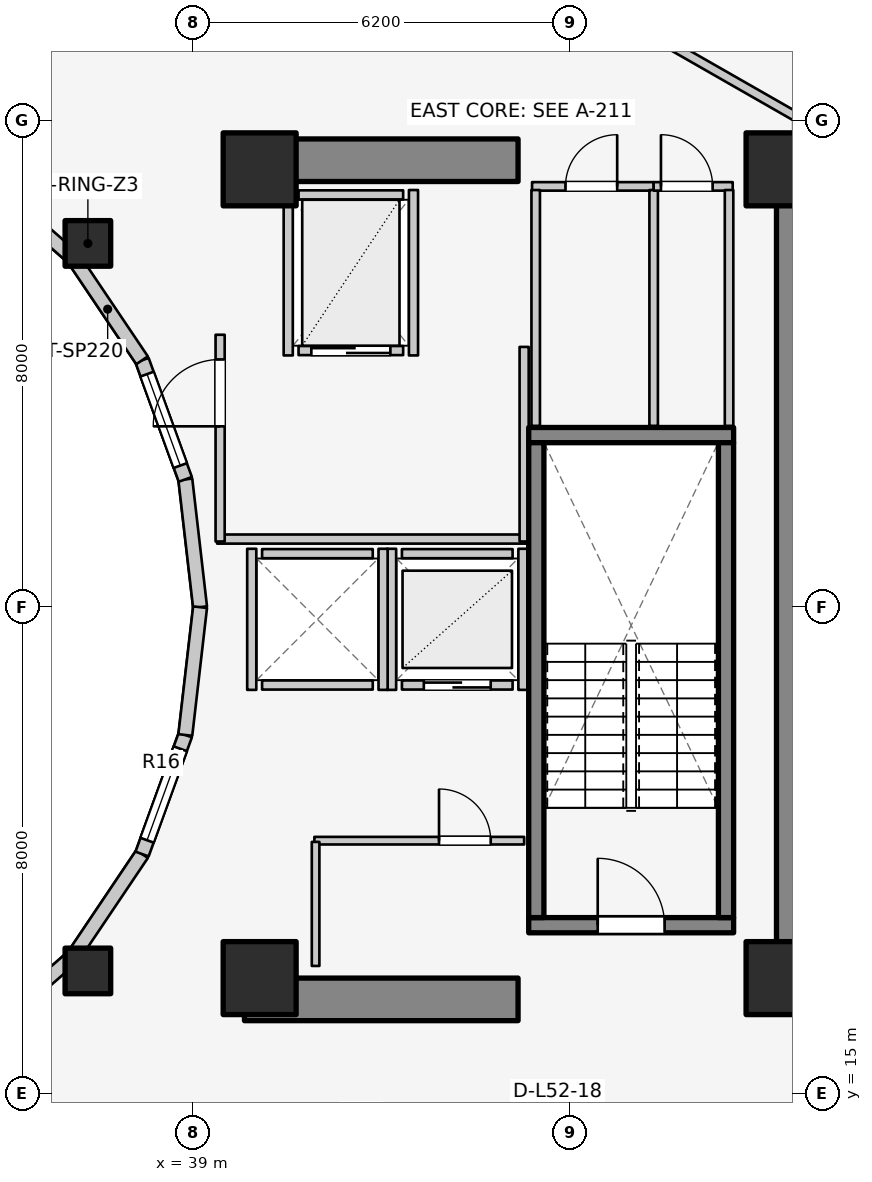
"""IFC4 building model, lengths in metres.
Left out: names, types, materials, properties, quantities, classifications, styles, units other than length and angle.
Written with IfcOpenShell. Run it as: python <this file> out.ifc"""

import sys

from ifc_helpers import new_model, si_unit, direction, frame, frame_2d, origin, origin_2d, place, context, subcontext, project, spatial, rectangle, extrude, element, fill, save


model = new_model("IFC4")
c1 = context("Model", 3, precision=1e-05, world=origin(), true_north=direction((0.0, 1.0)))
c2 = subcontext(c1, "Body", "Model", "MODEL_VIEW")
j1 = project(units=[si_unit("LENGTHUNIT", "METRE"), si_unit("PLANEANGLEUNIT", "RADIAN")], contexts=[c1])
p1 = place(None, origin())
s1 = spatial("IfcSite", under=j1, at=p1, CompositionType="ELEMENT")
p2 = place(p1, origin())
s2 = spatial("IfcBuilding", under=s1, at=p2, CompositionType="ELEMENT")
p3 = place(p2, frame((0.0, 0.0, 171.5)))
s3 = spatial("IfcBuildingStorey", under=s2, at=p3, CompositionType="ELEMENT", Elevation=171.5)
p4 = place(p3, frame((48.95, 17.05, 0.0), z_axis=(0.0, 0.0, 1.0), x_axis=(0.0, 1.0, 0.0)))
e1 = element("IfcWall", 1, at=p4, inside=s3, PredefinedType="SHEAR", context=c2, shape_type="SweptSolid", body=[
    extrude(rectangle(XDim=12.8, YDim=0.7, at=frame_2d((6.4, 0.0))), origin(), (0.0, 0.0, 1.0), 3.1),
])
for number, where, z_axis, x_axis in (
    (2, (39.85, 16.55, 0.0), (0.0, 0.0, 1.0), (1.0, 0.0, 0.0)),
    (3, (39.85, 30.35, 0.0), (0.0, 0.0, 1.0), (1.0, 0.0, 0.0)),
):
    element("IfcWall", number, at=place(p3, frame(where, z_axis=z_axis, x_axis=x_axis)), inside=s3, PredefinedType="SHEAR", context=c2, shape_type="SweptSolid", body=[
        extrude(rectangle(XDim=4.5, YDim=0.7, at=frame_2d((2.25, 0.0))), origin(), (0.0, 0.0, 1.0), 3.1),
    ])
p5 = place(p3, frame((44.525, 17.77, 0.0), z_axis=(0.0, 0.0, 1.0), x_axis=(1.0, 0.0, 0.0)))
e4 = element("IfcWall", 4, at=p5, inside=s3, PredefinedType="SOLIDWALL", context=c2, shape_type="SweptSolid", body=[
    extrude(rectangle(XDim=3.37, YDim=0.25, at=frame_2d((1.685, 0.0))), origin(), (0.0, 0.0, 1.0), 3.1),
])
p6 = place(p5, frame((1.135, 0.0, 0.0)))
e5 = element("IfcOpeningElement", 5, at=p6, cuts=e4, PredefinedType="OPENING", context=c2, shape_type="SweptSolid", body=[
    extrude(rectangle(XDim=1.1, YDim=2.1, at=frame_2d((0.55, 1.05))), frame((0.0, 0.135, 0.0), z_axis=(0.0, -1.0, 0.0), x_axis=(1.0, 0.0, 0.0)), (0.0, 0.0, 1.0), 0.27),
])
p7 = place(p3, frame((44.525, 25.83, 0.0), z_axis=(0.0, 0.0, 1.0), x_axis=(1.0, 0.0, 0.0)))
e6 = element("IfcWall", 6, at=p7, inside=s3, PredefinedType="SOLIDWALL", context=c2, shape_type="SweptSolid", body=[
    extrude(rectangle(XDim=3.37, YDim=0.25, at=frame_2d((1.685, 0.0))), origin(), (0.0, 0.0, 1.0), 3.1),
])
for number, where, z_axis, x_axis in (
    (7, (44.65, 17.895, 0.0), (0.0, 0.0, 1.0), (0.0, 1.0, 0.0)),
    (8, (47.77, 17.895, 0.0), (0.0, 0.0, 1.0), (0.0, 1.0, 0.0)),
):
    element("IfcWall", number, at=place(p3, frame(where, z_axis=z_axis, x_axis=x_axis)), inside=s3, PredefinedType="SOLIDWALL", context=c2, shape_type="SweptSolid", body=[
        extrude(rectangle(XDim=7.81, YDim=0.25, at=frame_2d((3.905, 0.0))), origin(), (0.0, 0.0, 1.0), 3.1),
    ])
for number, where, z_axis, x_axis in (
    (9, (40.1, 16.9, 0.0), (0.0, 0.0, 1.0), (1.0, 0.0, 0.0)),
    (10, (48.7, 16.9, 0.0), (0.0, 0.0, 1.0), (1.0, 0.0, 0.0)),
    (11, (48.7, 30.2, 0.0), (0.0, 0.0, 1.0), (1.0, 0.0, 0.0)),
    (12, (40.1, 30.2, 0.0), (0.0, 0.0, 1.0), (1.0, 0.0, 0.0)),
):
    element("IfcColumn", number, at=place(p3, frame(where, z_axis=z_axis, x_axis=x_axis)), inside=s3, PredefinedType="COLUMN", context=c2, shape_type="SweptSolid", body=[
        extrude(rectangle(XDim=1.2, YDim=1.2, at=origin_2d()), origin(), (0.0, 0.0, 1.0), 3.1),
    ])
for number, where, z_axis, x_axis in (
    (13, (37.275, 28.982, 0.0), (0.0, 0.0, 1.0), (1.0, 0.0, 0.0)),
    (14, (37.275, 17.018, 0.0), (0.0, 0.0, 1.0), (1.0, 0.0, 0.0)),
):
    element("IfcColumn", number, at=place(p3, frame(where, z_axis=z_axis, x_axis=x_axis)), inside=s3, PredefinedType="COLUMN", context=c2, shape_type="SweptSolid", body=[
        extrude(rectangle(XDim=0.75, YDim=0.75, at=origin_2d()), origin(), (0.0, 0.0, 1.0), 3.1),
    ])
p8 = place(p3, frame((39.12, 23.0, 0.0), z_axis=(0.0, 0.0, 1.0), x_axis=(-0.114711713601, 0.993398823617, 0.0)))
e15 = element("IfcWall", 15, at=p8, inside=s3, PredefinedType="STANDARD", context=c2, shape_type="SweptSolid", body=[
    extrude(rectangle(XDim=2.115, YDim=0.23, at=frame_2d((1.058, 0.0))), origin(), (0.0, 0.0, 1.0), 2.84),
])
p9 = place(p3, frame((38.877, 25.102, 0.0), z_axis=(0.0, 0.0, 1.0), x_axis=(-0.341423187295, 0.93990968033, 0.0)))
e16 = element("IfcWall", 16, at=p9, inside=s3, PredefinedType="STANDARD", context=c2, shape_type="SweptSolid", body=[
    extrude(rectangle(XDim=2.084, YDim=0.23, at=frame_2d((1.042, 0.0))), origin(), (0.0, 0.0, 1.0), 2.84),
])
p10 = place(p9, frame((0.242, 0.0, 0.85)))
e17 = element("IfcOpeningElement", 17, at=p10, cuts=e16, PredefinedType="OPENING", context=c2, shape_type="SweptSolid", body=[
    extrude(rectangle(XDim=1.6, YDim=1.65, at=frame_2d((0.8, 0.825))), frame((0.0, 0.125, 0.0), z_axis=(0.0, -1.0, 0.0), x_axis=(1.0, 0.0, 0.0)), (0.0, 0.0, 1.0), 0.25),
])
p11 = place(p3, frame((38.166, 27.06, 0.0), z_axis=(0.0, 0.0, 1.0), x_axis=(-0.558197800898, 0.829707909492, 0.0)))
e18 = element("IfcWall", 18, at=p11, inside=s3, PredefinedType="STANDARD", context=c2, shape_type="SweptSolid", body=[
    extrude(rectangle(XDim=2.027, YDim=0.23, at=frame_2d((1.013, 0.0))), origin(), (0.0, 0.0, 1.0), 2.16),
])
for number, where, z_axis, x_axis in (
    (19, (37.035, 28.742, 0.0), (0.0, 0.0, 1.0), (-0.753, 0.659, 0.0)),
    (20, (35.56, 15.968, 0.0), (0.0, 0.0, 1.0), (0.753, 0.659, 0.0)),
):
    element("IfcWall", number, at=place(p3, frame(where, z_axis=z_axis, x_axis=x_axis)), inside=s3, PredefinedType="STANDARD", context=c2, shape_type="SweptSolid", body=[
        extrude(rectangle(XDim=1.959, YDim=0.23, at=frame_2d((0.98, 0.0))), origin(), (0.0, 0.0, 1.0), 2.16),
    ])
p12 = place(p3, frame((37.035, 17.258, 0.0), z_axis=(0.0, 0.0, 1.0), x_axis=(0.558197800898, 0.829707909492, 0.0)))
e21 = element("IfcWall", 21, at=p12, inside=s3, PredefinedType="STANDARD", context=c2, shape_type="SweptSolid", body=[
    extrude(rectangle(XDim=2.027, YDim=0.23, at=frame_2d((1.013, 0.0))), origin(), (0.0, 0.0, 1.0), 2.16),
])
p13 = place(p3, frame((38.166, 18.94, 0.0), z_axis=(0.0, 0.0, 1.0), x_axis=(0.341423187295, 0.93990968033, 0.0)))
e22 = element("IfcWall", 22, at=p13, inside=s3, PredefinedType="STANDARD", context=c2, shape_type="SweptSolid", body=[
    extrude(rectangle(XDim=2.084, YDim=0.23, at=frame_2d((1.042, 0.0))), origin(), (0.0, 0.0, 1.0), 2.84),
])
p14 = place(p13, frame((0.242, 0.0, 0.85)))
e23 = element("IfcOpeningElement", 23, at=p14, cuts=e22, PredefinedType="OPENING", context=c2, shape_type="SweptSolid", body=[
    extrude(rectangle(XDim=1.6, YDim=1.65, at=frame_2d((0.8, 0.825))), frame((0.0, 0.125, 0.0), z_axis=(0.0, -1.0, 0.0), x_axis=(1.0, 0.0, 0.0)), (0.0, 0.0, 1.0), 0.25),
])
p15 = place(p3, frame((38.877, 20.898, 0.0), z_axis=(0.0, 0.0, 1.0), x_axis=(0.114711713601, 0.993398823617, 0.0)))
e24 = element("IfcWall", 24, at=p15, inside=s3, PredefinedType="STANDARD", context=c2, shape_type="SweptSolid", body=[
    extrude(rectangle(XDim=2.115, YDim=0.23, at=frame_2d((1.058, 0.0))), origin(), (0.0, 0.0, 1.0), 2.84),
])
p16 = place(p3, frame((42.44, 21.72, 0.0), z_axis=(0.0, 0.0, 1.0), x_axis=(1.0, 0.0, 0.0)))
e25 = element("IfcWall", 25, at=p16, inside=s3, PredefinedType="SOLIDWALL", context=c2, shape_type="SweptSolid", body=[
    extrude(rectangle(XDim=1.82, YDim=0.15, at=frame_2d((0.91, 0.0))), origin(), (0.0, 0.0, 1.0), 2.855),
])
p17 = place(p16, frame((0.36, 0.0, 0.0)))
e26 = element("IfcOpeningElement", 26, at=p17, cuts=e25, PredefinedType="OPENING", context=c2, shape_type="SweptSolid", body=[
    extrude(rectangle(XDim=1.1, YDim=2.1, at=frame_2d((0.55, 1.05))), frame((0.0, 0.085, 0.0), z_axis=(0.0, -1.0, 0.0), x_axis=(1.0, 0.0, 0.0)), (0.0, 0.0, 1.0), 0.17),
])
p18 = place(p3, frame((42.44, 23.88, 0.0), z_axis=(0.0, 0.0, 1.0), x_axis=(1.0, 0.0, 0.0)))
e27 = element("IfcWall", 27, at=p18, inside=s3, PredefinedType="SOLIDWALL", context=c2, shape_type="SweptSolid", body=[
    extrude(rectangle(XDim=1.82, YDim=0.15, at=frame_2d((0.91, 0.0))), origin(), (0.0, 0.0, 1.0), 2.855),
])
for number, where, z_axis, x_axis in (
    (28, (42.27, 21.64, 0.0), (0.0, 0.0, 1.0), (0.0, 1.0, 0.0)),
    (29, (44.43, 21.64, 0.0), (0.0, 0.0, 1.0), (0.0, 1.0, 0.0)),
):
    element("IfcWall", number, at=place(p3, frame(where, z_axis=z_axis, x_axis=x_axis)), inside=s3, PredefinedType="SOLIDWALL", context=c2, shape_type="SweptSolid", body=[
        extrude(rectangle(XDim=2.32, YDim=0.15, at=frame_2d((1.16, 0.0))), origin(), (0.0, 0.0, 1.0), 2.855),
    ])
for number, where, z_axis, x_axis in (
    (30, (40.14, 21.72, 0.0), (0.0, 0.0, 1.0), (1.0, 0.0, 0.0)),
    (31, (40.14, 23.88, 0.0), (0.0, 0.0, 1.0), (1.0, 0.0, 0.0)),
):
    element("IfcWall", number, at=place(p3, frame(where, z_axis=z_axis, x_axis=x_axis)), inside=s3, PredefinedType="SOLIDWALL", context=c2, shape_type="SweptSolid", body=[
        extrude(rectangle(XDim=1.82, YDim=0.15, at=frame_2d((0.91, 0.0))), origin(), (0.0, 0.0, 1.0), 2.12),
    ])
p19 = place(p3, frame((39.97, 21.64, 0.0), z_axis=(0.0, 0.0, 1.0), x_axis=(0.0, 1.0, 0.0)))
e32 = element("IfcWall", 32, at=p19, inside=s3, PredefinedType="SOLIDWALL", context=c2, shape_type="SweptSolid", body=[
    extrude(rectangle(XDim=2.32, YDim=0.15, at=frame_2d((1.16, 0.0))), origin(), (0.0, 0.0, 1.0), 2.12),
])
p20 = place(p3, frame((42.13, 21.64, 0.0), z_axis=(0.0, 0.0, 1.0), x_axis=(0.0, 1.0, 0.0)))
e33 = element("IfcWall", 33, at=p20, inside=s3, PredefinedType="SOLIDWALL", context=c2, shape_type="SweptSolid", body=[
    extrude(rectangle(XDim=2.32, YDim=0.15, at=frame_2d((1.16, 0.0))), origin(), (0.0, 0.0, 1.0), 2.855),
])
p21 = place(p3, frame((40.74, 27.22, 0.0), z_axis=(0.0, 0.0, 1.0), x_axis=(1.0, 0.0, 0.0)))
e34 = element("IfcWall", 34, at=p21, inside=s3, PredefinedType="SOLIDWALL", context=c2, shape_type="SweptSolid", body=[
    extrude(rectangle(XDim=1.72, YDim=0.15, at=frame_2d((0.86, 0.0))), origin(), (0.0, 0.0, 1.0), 2.855),
])
p22 = place(p21, frame((0.21, 0.0, 0.0)))
e35 = element("IfcOpeningElement", 35, at=p22, cuts=e34, PredefinedType="OPENING", context=c2, shape_type="SweptSolid", body=[
    extrude(rectangle(XDim=1.3, YDim=2.1, at=frame_2d((0.65, 1.05))), frame((0.0, 0.085, 0.0), z_axis=(0.0, -1.0, 0.0), x_axis=(1.0, 0.0, 0.0)), (0.0, 0.0, 1.0), 0.17),
])
p23 = place(p3, frame((40.74, 29.78, 0.0), z_axis=(0.0, 0.0, 1.0), x_axis=(1.0, 0.0, 0.0)))
e36 = element("IfcWall", 36, at=p23, inside=s3, PredefinedType="SOLIDWALL", context=c2, shape_type="SweptSolid", body=[
    extrude(rectangle(XDim=1.72, YDim=0.15, at=frame_2d((0.86, 0.0))), origin(), (0.0, 0.0, 1.0), 2.855),
])
for number, where, z_axis, x_axis in (
    (37, (40.57, 27.14, 0.0), (0.0, 0.0, 1.0), (0.0, 1.0, 0.0)),
    (38, (42.63, 27.14, 0.0), (0.0, 0.0, 1.0), (0.0, 1.0, 0.0)),
):
    element("IfcWall", number, at=place(p3, frame(where, z_axis=z_axis, x_axis=x_axis)), inside=s3, PredefinedType="SOLIDWALL", context=c2, shape_type="SweptSolid", body=[
        extrude(rectangle(XDim=2.72, YDim=0.15, at=frame_2d((1.36, 0.0))), origin(), (0.0, 0.0, 1.0), 2.855),
    ])
p24 = place(p3, frame((39.4, 24.12, 0.0), z_axis=(0.0, 0.0, 1.0), x_axis=(1.0, 0.0, 0.0)))
e39 = element("IfcWall", 39, at=p24, inside=s3, PredefinedType="PARTITIONING", context=c2, shape_type="SweptSolid", body=[
    extrude(rectangle(XDim=5.08, YDim=0.15, at=frame_2d((2.54, 0.0))), origin(), (0.0, 0.0, 1.0), 2.12),
])
p25 = place(p3, frame((44.45, 24.08, 0.0), z_axis=(0.0, 0.0, 1.0), x_axis=(0.0, 1.0, 0.0)))
e40 = element("IfcWall", 40, at=p25, inside=s3, PredefinedType="PARTITIONING", context=c2, shape_type="SweptSolid", body=[
    extrude(rectangle(XDim=3.2, YDim=0.15, at=frame_2d((1.6, 0.0))), origin(), (0.0, 0.0, 1.0), 2.855),
])
p26 = place(p3, frame((39.45, 24.08, 0.0), z_axis=(0.0, 0.0, 1.0), x_axis=(0.0, 1.0, 0.0)))
e41 = element("IfcWall", 41, at=p26, inside=s3, PredefinedType="PARTITIONING", context=c2, shape_type="SweptSolid", body=[
    extrude(rectangle(XDim=3.4, YDim=0.15, at=frame_2d((1.7, 0.0))), origin(), (0.0, 0.0, 1.0), 2.855),
])
p27 = place(p26, frame((1.894, 0.0, 0.0)))
e42 = element("IfcOpeningElement", 42, at=p27, cuts=e41, PredefinedType="OPENING", context=c2, shape_type="SweptSolid", body=[
    extrude(rectangle(XDim=1.1, YDim=2.1, at=frame_2d((0.55, 1.05))), frame((0.0, 0.085, 0.0), z_axis=(0.0, -1.0, 0.0), x_axis=(1.0, 0.0, 0.0)), (0.0, 0.0, 1.0), 0.17),
])
p28 = place(p3, frame((41.0, 19.16, 0.0), z_axis=(0.0, 0.0, 1.0), x_axis=(1.0, 0.0, 0.0)))
e43 = element("IfcWall", 43, at=p28, inside=s3, PredefinedType="PARTITIONING", context=c2, shape_type="SweptSolid", body=[
    extrude(rectangle(XDim=3.45, YDim=0.125, at=frame_2d((1.725, 0.0))), origin(), (0.0, 0.0, 1.0), 2.12),
])
p29 = place(p28, frame((2.05, 0.0, 0.0)))
e44 = element("IfcOpeningElement", 44, at=p29, cuts=e43, PredefinedType="OPENING", context=c2, shape_type="SweptSolid", body=[
    extrude(rectangle(XDim=0.85, YDim=2.05, at=frame_2d((0.425, 1.025))), frame((0.0, 0.073, 0.0), z_axis=(0.0, -1.0, 0.0), x_axis=(1.0, 0.0, 0.0)), (0.0, 0.0, 1.0), 0.145),
])
p30 = place(p3, frame((41.02, 17.1, 0.0), z_axis=(0.0, 0.0, 1.0), x_axis=(0.0, 1.0, 0.0)))
e45 = element("IfcWall", 45, at=p30, inside=s3, PredefinedType="PARTITIONING", context=c2, shape_type="SweptSolid", body=[
    extrude(rectangle(XDim=2.04, YDim=0.125, at=frame_2d((1.02, 0.0))), origin(), (0.0, 0.0, 1.0), 2.855),
])
p31 = place(p3, frame((44.58, 29.92, 0.0), z_axis=(0.0, 0.0, 1.0), x_axis=(1.0, 0.0, 0.0)))
e46 = element("IfcWall", 46, at=p31, inside=s3, PredefinedType="PLUMBINGWALL", context=c2, shape_type="SweptSolid", body=[
    extrude(rectangle(XDim=2.0, YDim=0.14, at=frame_2d((1.0, 0.0))), origin(), (0.0, 0.0, 1.0), 2.855),
])
p32 = place(p31, frame((0.55, 0.0, 0.0)))
e47 = element("IfcOpeningElement", 47, at=p32, cuts=e46, PredefinedType="OPENING", context=c2, shape_type="SweptSolid", body=[
    extrude(rectangle(XDim=0.85, YDim=2.05, at=frame_2d((0.425, 1.025))), frame((0.0, 0.08, 0.0), z_axis=(0.0, -1.0, 0.0), x_axis=(1.0, 0.0, 0.0)), (0.0, 0.0, 1.0), 0.16),
])
for number, where, z_axis, x_axis in (
    (48, (44.64, 25.98, 0.0), (0.0, 0.0, 1.0), (0.0, 1.0, 0.0)),
    (49, (46.58, 25.98, 0.0), (0.0, 0.0, 1.0), (0.0, 1.0, 0.0)),
):
    element("IfcWall", number, at=place(p3, frame(where, z_axis=z_axis, x_axis=x_axis)), inside=s3, PredefinedType="PLUMBINGWALL", context=c2, shape_type="SweptSolid", body=[
        extrude(rectangle(XDim=3.88, YDim=0.14, at=frame_2d((1.94, 0.0))), origin(), (0.0, 0.0, 1.0), 2.855),
    ])
p33 = place(p3, frame((46.58, 29.92, 0.0), z_axis=(0.0, 0.0, 1.0), x_axis=(1.0, 0.0, 0.0)))
e50 = element("IfcWall", 50, at=p33, inside=s3, PredefinedType="PLUMBINGWALL", context=c2, shape_type="SweptSolid", body=[
    extrude(rectangle(XDim=1.3, YDim=0.14, at=frame_2d((0.65, 0.0))), origin(), (0.0, 0.0, 1.0), 2.855),
])
p34 = place(p33, frame((0.12, 0.0, 0.0)))
e51 = element("IfcOpeningElement", 51, at=p34, cuts=e50, PredefinedType="OPENING", context=c2, shape_type="SweptSolid", body=[
    extrude(rectangle(XDim=0.85, YDim=2.05, at=frame_2d((0.425, 1.025))), frame((0.0, 0.08, 0.0), z_axis=(0.0, -1.0, 0.0), x_axis=(1.0, 0.0, 0.0)), (0.0, 0.0, 1.0), 0.16),
])
p35 = place(p3, frame((47.82, 25.98, 0.0), z_axis=(0.0, 0.0, 1.0), x_axis=(0.0, 1.0, 0.0)))
e52 = element("IfcWall", 52, at=p35, inside=s3, PredefinedType="PLUMBINGWALL", context=c2, shape_type="SweptSolid", body=[
    extrude(rectangle(XDim=3.88, YDim=0.14, at=frame_2d((1.94, 0.0))), origin(), (0.0, 0.0, 1.0), 2.855),
])
p36 = place(p3, frame((46.757, 32.305, 0.0), z_axis=(0.0, 0.0, 1.0), x_axis=(0.867991349648, -0.496579315857, 0.0)))
e53 = element("IfcWall", 53, at=p36, inside=s3, PredefinedType="PARTITIONING", context=c2, shape_type="SweptSolid", body=[
    extrude(rectangle(XDim=2.567, YDim=0.15, at=frame_2d((1.283, 0.0))), origin(), (0.0, 0.0, 1.0), 2.22),
])
p37 = place(p3, frame((35.55, 15.985, 0.0), z_axis=(0.0, 0.0, 1.0), x_axis=(0.524565340045, -0.851370192116, 0.0)))
e54 = element("IfcWall", 54, at=p37, inside=s3, PredefinedType="PARTITIONING", context=c2, shape_type="SweptSolid", body=[
    extrude(rectangle(XDim=3.027, YDim=0.125, at=frame_2d((1.514, 0.0))), origin(), (0.0, 0.0, 1.0), 2.299),
])
p38 = place(p10, origin())
e55 = element("IfcWindow", 55, at=p38, inside=s3, PartitioningType="SINGLE_PANEL", PredefinedType="WINDOW", context=c2, shape_type="SweptSolid", body=[
    extrude(rectangle(XDim=1.6, YDim=1.65, at=frame_2d((0.8, 0.825))), frame((0.0, 0.03, 0.0), z_axis=(0.0, -1.0, 0.0), x_axis=(1.0, 0.0, 0.0)), (0.0, 0.0, 1.0), 0.06),
])
fill(e17, e55)
p39 = place(p14, origin())
e56 = element("IfcWindow", 56, at=p39, inside=s3, PartitioningType="SINGLE_PANEL", PredefinedType="WINDOW", context=c2, shape_type="SweptSolid", body=[
    extrude(rectangle(XDim=1.6, YDim=1.65, at=frame_2d((0.8, 0.825))), frame((0.0, 0.03, 0.0), z_axis=(0.0, -1.0, 0.0), x_axis=(1.0, 0.0, 0.0)), (0.0, 0.0, 1.0), 0.06),
])
fill(e23, e56)
p40 = place(p6, origin())
e57 = element("IfcDoor", 57, at=p40, inside=s3, OperationType="SINGLE_SWING_LEFT", PredefinedType="DOOR", context=c2, shape_type="SweptSolid", body=[
    extrude(rectangle(XDim=1.1, YDim=2.1, at=frame_2d((0.55, 1.05))), frame((0.0, 0.025, 0.0), z_axis=(0.0, -1.0, 0.0), x_axis=(1.0, 0.0, 0.0)), (0.0, 0.0, 1.0), 0.05),
])
fill(e5, e57)
p41 = place(p17, origin())
e58 = element("IfcDoor", 58, at=p41, inside=s3, OperationType="DOUBLE_DOOR_SLIDING", PredefinedType="DOOR", context=c2, shape_type="SweptSolid", body=[
    extrude(rectangle(XDim=1.1, YDim=2.1, at=frame_2d((0.55, 1.05))), frame((0.0, 0.025, 0.0), z_axis=(0.0, -1.0, 0.0), x_axis=(1.0, 0.0, 0.0)), (0.0, 0.0, 1.0), 0.05),
])
fill(e26, e58)
p42 = place(p22, origin())
e59 = element("IfcDoor", 59, at=p42, inside=s3, OperationType="DOUBLE_DOOR_SLIDING", PredefinedType="DOOR", context=c2, shape_type="SweptSolid", body=[
    extrude(rectangle(XDim=1.3, YDim=2.1, at=frame_2d((0.65, 1.05))), frame((0.0, 0.025, 0.0), z_axis=(0.0, -1.0, 0.0), x_axis=(1.0, 0.0, 0.0)), (0.0, 0.0, 1.0), 0.05),
])
fill(e35, e59)
p43 = place(p27, origin())
e60 = element("IfcDoor", 60, at=p43, inside=s3, OperationType="SINGLE_SWING_LEFT", PredefinedType="DOOR", context=c2, shape_type="SweptSolid", body=[
    extrude(rectangle(XDim=1.1, YDim=2.1, at=frame_2d((0.55, 1.05))), frame((0.0, 0.025, 0.0), z_axis=(0.0, -1.0, 0.0), x_axis=(1.0, 0.0, 0.0)), (0.0, 0.0, 1.0), 0.05),
])
fill(e42, e60)
p44 = place(p29, origin())
e61 = element("IfcDoor", 61, at=p44, inside=s3, OperationType="SINGLE_SWING_LEFT", PredefinedType="DOOR", context=c2, shape_type="SweptSolid", body=[
    extrude(rectangle(XDim=0.85, YDim=2.05, at=frame_2d((0.425, 1.025))), frame((0.0, 0.025, 0.0), z_axis=(0.0, -1.0, 0.0), x_axis=(1.0, 0.0, 0.0)), (0.0, 0.0, 1.0), 0.05),
])
fill(e44, e61)
p45 = place(p32, origin())
e62 = element("IfcDoor", 62, at=p45, inside=s3, OperationType="SINGLE_SWING_RIGHT", PredefinedType="DOOR", context=c2, shape_type="SweptSolid", body=[
    extrude(rectangle(XDim=0.85, YDim=2.05, at=frame_2d((0.425, 1.025))), frame((0.0, 0.025, 0.0), z_axis=(0.0, -1.0, 0.0), x_axis=(1.0, 0.0, 0.0)), (0.0, 0.0, 1.0), 0.05),
])
fill(e47, e62)
p46 = place(p34, origin())
e63 = element("IfcDoor", 63, at=p46, inside=s3, OperationType="SINGLE_SWING_LEFT", PredefinedType="DOOR", context=c2, shape_type="SweptSolid", body=[
    extrude(rectangle(XDim=0.85, YDim=2.05, at=frame_2d((0.425, 1.025))), frame((0.0, 0.025, 0.0), z_axis=(0.0, -1.0, 0.0), x_axis=(1.0, 0.0, 0.0)), (0.0, 0.0, 1.0), 0.05),
])
fill(e51, e63)
save(model, sys.argv[1])
